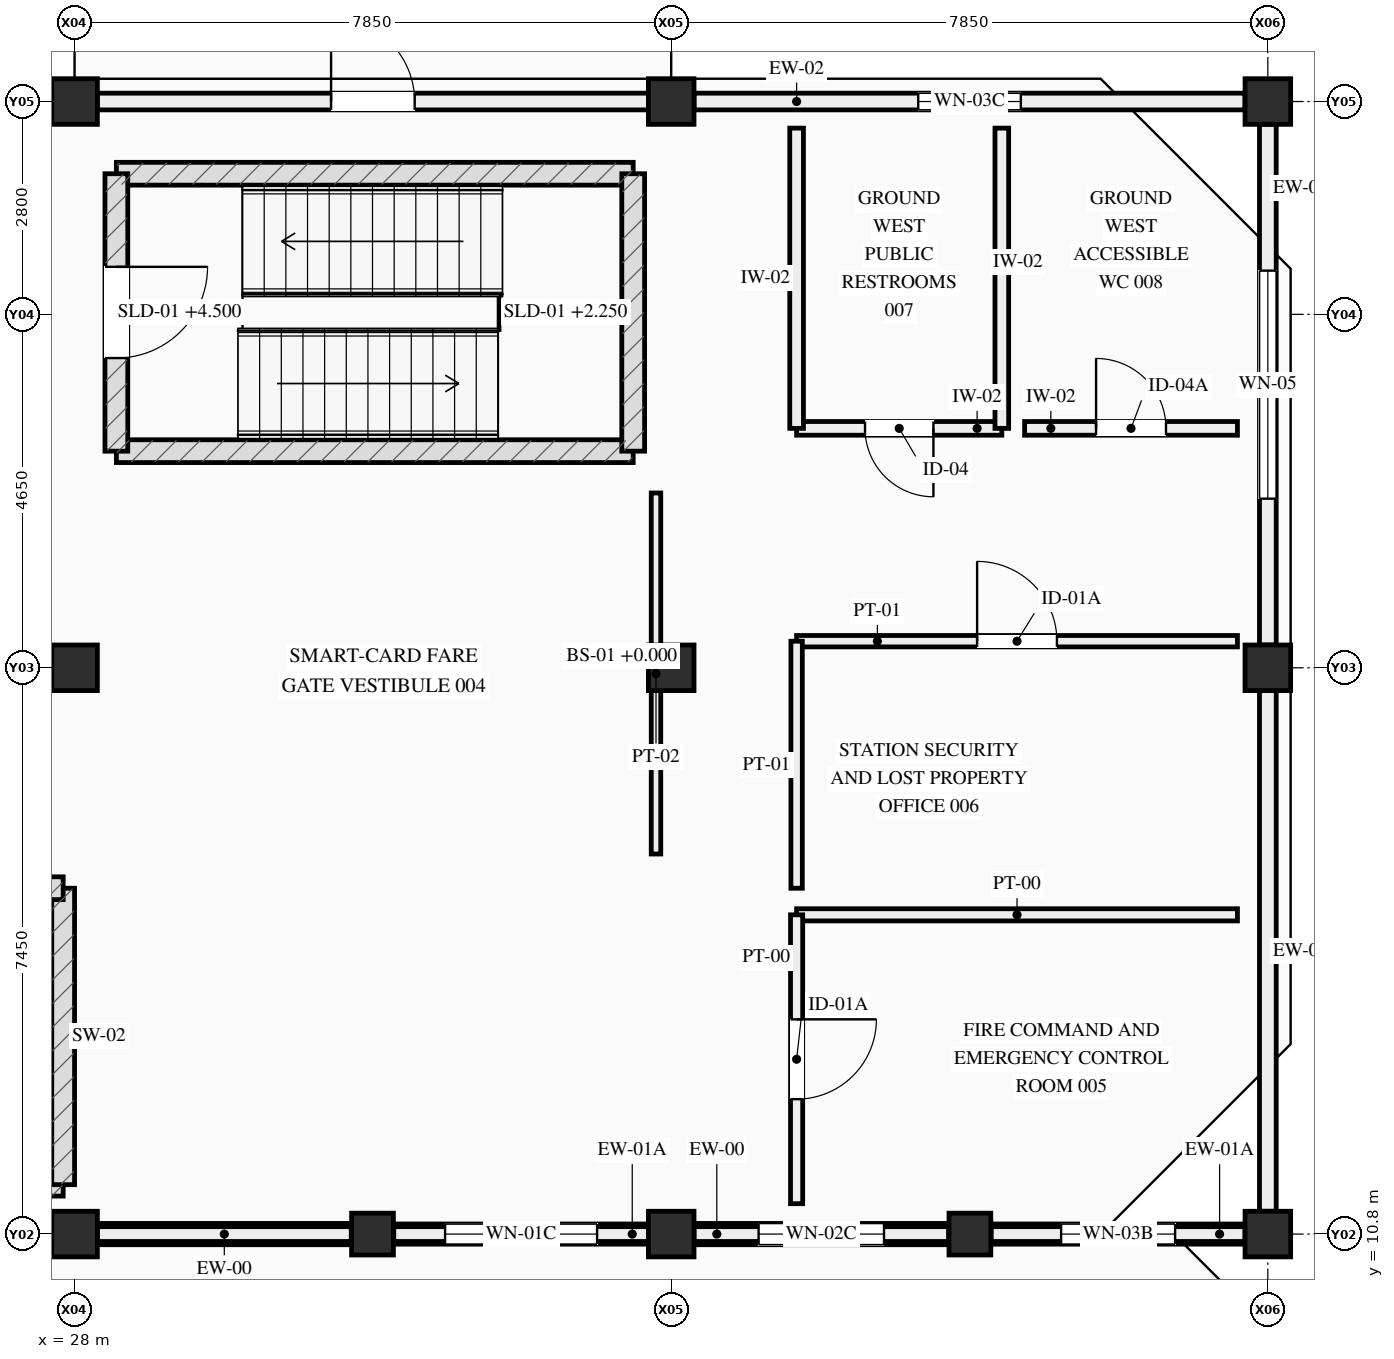
"""IFC4 building model, lengths in metres.
Left out: names, types, materials, properties, quantities, classifications, styles, units other than length and angle.
Written with IfcOpenShell. Run it as: python <this file> out.ifc"""

import sys

from ifc_helpers import new_model, si_unit, direction, frame, frame_2d, origin, origin_2d, place, context, subcontext, project, spatial, rectangle, circle, extrude, element, fill, save


model = new_model("IFC4")
c1 = context("Model", 3, precision=1e-05, world=origin(), true_north=direction((0.0, 1.0)))
c2 = subcontext(c1, "Body", "Model", "MODEL_VIEW")
j1 = project(units=[si_unit("LENGTHUNIT", "METRE"), si_unit("PLANEANGLEUNIT", "RADIAN")], contexts=[c1])
p1 = place(None, origin())
s1 = spatial("IfcSite", under=j1, at=p1, CompositionType="ELEMENT")
p2 = place(p1, origin())
s2 = spatial("IfcBuilding", under=s1, at=p2, CompositionType="ELEMENT")
p3 = place(p2, origin())
s3 = spatial("IfcBuildingStorey", under=s2, at=p3, CompositionType="ELEMENT", Elevation=0.0)
for number, where, z_axis, x_axis in (
    (1, (28.0, 10.8, 0.0), (0.0, 0.0, 1.0), (1.0, 0.0, 0.0)),
    (2, (28.0, 18.25, 0.0), (0.0, 0.0, 1.0), (1.0, 0.0, 0.0)),
    (3, (28.0, 25.7, 0.0), (0.0, 0.0, 1.0), (1.0, 0.0, 0.0)),
    (4, (35.85, 10.8, 0.0), (0.0, 0.0, 1.0), (1.0, 0.0, 0.0)),
    (5, (35.85, 18.25, 0.0), (0.0, 0.0, 1.0), (1.0, 0.0, 0.0)),
    (6, (35.85, 25.7, 0.0), (0.0, 0.0, 1.0), (1.0, 0.0, 0.0)),
    (7, (43.7, 10.8, 0.0), (0.0, 0.0, 1.0), (1.0, 0.0, 0.0)),
    (8, (43.7, 18.25, 0.0), (0.0, 0.0, 1.0), (1.0, 0.0, 0.0)),
    (9, (43.7, 25.7, 0.0), (0.0, 0.0, 1.0), (1.0, 0.0, 0.0)),
):
    element("IfcColumn", number, at=place(p3, frame(where, z_axis=z_axis, x_axis=x_axis)), inside=s3, PredefinedType="COLUMN", context=c2, shape_type="SweptSolid", body=[
        extrude(rectangle(XDim=0.6, YDim=0.6, at=origin_2d()), origin(), (0.0, 0.0, 1.0), 4.5),
    ])
for number, where, z_axis, x_axis in (
    (10, (31.92, 10.8, 0.0), (0.0, 0.0, 1.0), (1.0, 0.0, 0.0)),
    (11, (39.78, 10.8, 0.0), (0.0, 0.0, 1.0), (1.0, 0.0, 0.0)),
):
    element("IfcColumn", number, at=place(p3, frame(where, z_axis=z_axis, x_axis=x_axis)), inside=s3, PredefinedType="PILASTER", context=c2, shape_type="SweptSolid", body=[
        extrude(circle(Radius=0.275, at=origin_2d()), origin(), (0.0, 0.0, 1.0), 4.5),
    ])
p4 = place(p3, frame((31.64, 10.8, 0.0), z_axis=(0.0, 0.0, 1.0), x_axis=(-1.0, 0.0, 0.0)))
e12 = element("IfcWall", 12, at=p4, inside=s3, PredefinedType="STANDARD", context=c2, shape_type="SweptSolid", body=[
    extrude(rectangle(XDim=3.34, YDim=0.28, at=frame_2d((1.67, 0.0))), origin(), (0.0, 0.0, 1.0), 2.985),
])
p5 = place(p3, frame((31.64, 10.8, 3.35), z_axis=(0.0, 0.0, 1.0), x_axis=(-1.0, 0.0, 0.0)))
e13 = element("IfcWall", 13, at=p5, inside=s3, PredefinedType="STANDARD", context=c2, shape_type="SweptSolid", body=[
    extrude(rectangle(XDim=3.34, YDim=0.195, at=frame_2d((1.67, 0.0))), origin(), (0.0, 0.0, 1.0), 0.23),
])
p6 = place(p3, frame((35.55, 10.8, 0.0), z_axis=(0.0, 0.0, 1.0), x_axis=(-1.0, 0.0, 0.0)))
e14 = element("IfcWall", 14, at=p6, inside=s3, PredefinedType="STANDARD", context=c2, shape_type="SweptSolid", body=[
    extrude(rectangle(XDim=3.35, YDim=0.265, at=frame_2d((1.675, 0.0))), origin(), (0.0, 0.0, 1.0), 2.985),
])
p7 = place(p6, frame((0.675, 0.0, 0.92)))
e15 = element("IfcOpeningElement", 15, at=p7, cuts=e14, PredefinedType="OPENING", context=c2, shape_type="SweptSolid", body=[
    extrude(rectangle(XDim=2.0, YDim=1.5, at=frame_2d((1.0, 0.75))), frame((0.0, 0.142, 0.0), z_axis=(0.0, -1.0, 0.0), x_axis=(1.0, 0.0, 0.0)), (0.0, 0.0, 1.0), 0.285),
])
p8 = place(p3, frame((35.55, 10.8, 3.35), z_axis=(0.0, 0.0, 1.0), x_axis=(-1.0, 0.0, 0.0)))
e16 = element("IfcWall", 16, at=p8, inside=s3, PredefinedType="STANDARD", context=c2, shape_type="SweptSolid", body=[
    extrude(rectangle(XDim=3.35, YDim=0.195, at=frame_2d((1.675, 0.0))), origin(), (0.0, 0.0, 1.0), 0.23),
])
p9 = place(p3, frame((28.3, 25.7, 0.0), z_axis=(0.0, 0.0, 1.0), x_axis=(1.0, 0.0, 0.0)))
e17 = element("IfcWall", 17, at=p9, inside=s3, PredefinedType="STANDARD", context=c2, shape_type="SweptSolid", body=[
    extrude(rectangle(XDim=7.25, YDim=0.22, at=frame_2d((3.625, 0.0))), origin(), (0.0, 0.0, 1.0), 3.58),
])
p10 = place(p9, frame((3.075, 0.0, 0.0)))
e18 = element("IfcOpeningElement", 18, at=p10, cuts=e17, PredefinedType="OPENING", context=c2, shape_type="SweptSolid", body=[
    extrude(rectangle(XDim=1.1, YDim=2.2, at=frame_2d((0.55, 1.1))), frame((0.0, 0.12, 0.0), z_axis=(0.0, -1.0, 0.0), x_axis=(1.0, 0.0, 0.0)), (0.0, 0.0, 1.0), 0.24),
])
p11 = place(p3, frame((39.5, 10.8, 0.0), z_axis=(0.0, 0.0, 1.0), x_axis=(-1.0, 0.0, 0.0)))
e19 = element("IfcWall", 19, at=p11, inside=s3, PredefinedType="STANDARD", context=c2, shape_type="SweptSolid", body=[
    extrude(rectangle(XDim=3.35, YDim=0.28, at=frame_2d((1.675, 0.0))), origin(), (0.0, 0.0, 1.0), 2.985),
])
p12 = place(p11, frame((0.85, 0.0, 0.95)))
e20 = element("IfcOpeningElement", 20, at=p12, cuts=e19, PredefinedType="OPENING", context=c2, shape_type="SweptSolid", body=[
    extrude(rectangle(XDim=1.65, YDim=1.45, at=frame_2d((0.825, 0.725))), frame((0.0, 0.15, 0.0), z_axis=(0.0, -1.0, 0.0), x_axis=(1.0, 0.0, 0.0)), (0.0, 0.0, 1.0), 0.3),
])
p13 = place(p3, frame((39.5, 10.8, 3.35), z_axis=(0.0, 0.0, 1.0), x_axis=(-1.0, 0.0, 0.0)))
e21 = element("IfcWall", 21, at=p13, inside=s3, PredefinedType="STANDARD", context=c2, shape_type="SweptSolid", body=[
    extrude(rectangle(XDim=3.35, YDim=0.195, at=frame_2d((1.675, 0.0))), origin(), (0.0, 0.0, 1.0), 0.23),
])
p14 = place(p3, frame((43.4, 10.8, 0.0), z_axis=(0.0, 0.0, 1.0), x_axis=(-1.0, 0.0, 0.0)))
e22 = element("IfcWall", 22, at=p14, inside=s3, PredefinedType="STANDARD", context=c2, shape_type="SweptSolid", body=[
    extrude(rectangle(XDim=3.34, YDim=0.265, at=frame_2d((1.67, 0.0))), origin(), (0.0, 0.0, 1.0), 2.985),
])
p15 = place(p14, frame((0.92, 0.0, 1.0)))
e23 = element("IfcOpeningElement", 23, at=p15, cuts=e22, PredefinedType="OPENING", context=c2, shape_type="SweptSolid", body=[
    extrude(rectangle(XDim=1.5, YDim=1.25, at=frame_2d((0.75, 0.625))), frame((0.0, 0.142, 0.0), z_axis=(0.0, -1.0, 0.0), x_axis=(1.0, 0.0, 0.0)), (0.0, 0.0, 1.0), 0.285),
])
p16 = place(p3, frame((43.4, 10.8, 3.35), z_axis=(0.0, 0.0, 1.0), x_axis=(-1.0, 0.0, 0.0)))
e24 = element("IfcWall", 24, at=p16, inside=s3, PredefinedType="STANDARD", context=c2, shape_type="SweptSolid", body=[
    extrude(rectangle(XDim=3.34, YDim=0.195, at=frame_2d((1.67, 0.0))), origin(), (0.0, 0.0, 1.0), 0.23),
])
p17 = place(p3, frame((36.15, 25.7, 0.0), z_axis=(0.0, 0.0, 1.0), x_axis=(1.0, 0.0, 0.0)))
e25 = element("IfcWall", 25, at=p17, inside=s3, PredefinedType="STANDARD", context=c2, shape_type="SweptSolid", body=[
    extrude(rectangle(XDim=7.25, YDim=0.22, at=frame_2d((3.625, 0.0))), origin(), (0.0, 0.0, 1.0), 3.24),
])
p18 = place(p17, frame((2.95, 0.0, 0.98)))
e26 = element("IfcOpeningElement", 26, at=p18, cuts=e25, PredefinedType="OPENING", context=c2, shape_type="SweptSolid", body=[
    extrude(rectangle(XDim=1.35, YDim=1.35, at=frame_2d((0.675, 0.675))), frame((0.0, 0.12, 0.0), z_axis=(0.0, -1.0, 0.0), x_axis=(1.0, 0.0, 0.0)), (0.0, 0.0, 1.0), 0.24),
])
p19 = place(p3, frame((43.7, 17.95, 0.0), z_axis=(0.0, 0.0, 1.0), x_axis=(0.0, -1.0, 0.0)))
e27 = element("IfcWall", 27, at=p19, inside=s3, PredefinedType="STANDARD", context=c2, shape_type="SweptSolid", body=[
    extrude(rectangle(XDim=6.85, YDim=0.22, at=frame_2d((3.425, 0.0))), origin(), (0.0, 0.0, 1.0), 3.58),
])
p20 = place(p3, frame((43.7, 25.4, 0.0), z_axis=(0.0, 0.0, 1.0), x_axis=(0.0, -1.0, 0.0)))
e28 = element("IfcWall", 28, at=p20, inside=s3, PredefinedType="STANDARD", context=c2, shape_type="SweptSolid", body=[
    extrude(rectangle(XDim=6.85, YDim=0.22, at=frame_2d((3.425, 0.0))), origin(), (0.0, 0.0, 1.0), 3.24),
])
p21 = place(p20, frame((1.925, 0.0, 0.88)))
e29 = element("IfcOpeningElement", 29, at=p21, cuts=e28, PredefinedType="OPENING", context=c2, shape_type="SweptSolid", body=[
    extrude(rectangle(XDim=3.0, YDim=1.45, at=frame_2d((1.5, 0.725))), frame((0.0, 0.12, 0.0), z_axis=(0.0, -1.0, 0.0), x_axis=(1.0, 0.0, 0.0)), (0.0, 0.0, 1.0), 0.24),
])
for number, where, z_axis, x_axis in (
    (30, (35.35, 21.1, 0.0), (0.0, 0.0, 1.0), (-1.0, 0.0, 0.0)),
    (31, (28.55, 24.75, 0.0), (0.0, 0.0, 1.0), (1.0, 0.0, 0.0)),
):
    element("IfcWall", number, at=place(p3, frame(where, z_axis=z_axis, x_axis=x_axis)), inside=s3, PredefinedType="SHEAR", context=c2, shape_type="SweptSolid", body=[
        extrude(rectangle(XDim=6.8, YDim=0.3, at=frame_2d((3.4, 0.0))), origin(), (0.0, 0.0, 1.0), 4.26),
    ])
p22 = place(p3, frame((28.55, 21.1, 0.0), z_axis=(0.0, 0.0, 1.0), x_axis=(0.0, 1.0, 0.0)))
e32 = element("IfcWall", 32, at=p22, inside=s3, PredefinedType="SHEAR", context=c2, shape_type="SweptSolid", body=[
    extrude(rectangle(XDim=3.65, YDim=0.3, at=frame_2d((1.825, 0.0))), origin(), (0.0, 0.0, 1.0), 4.26),
])
p23 = place(p22, frame((1.225, 0.0, 0.0)))
e33 = element("IfcOpeningElement", 33, at=p23, cuts=e32, PredefinedType="OPENING", context=c2, shape_type="SweptSolid", body=[
    extrude(rectangle(XDim=1.2, YDim=2.2, at=frame_2d((0.6, 1.1))), frame((0.0, 0.16, 0.0), z_axis=(0.0, -1.0, 0.0), x_axis=(1.0, 0.0, 0.0)), (0.0, 0.0, 1.0), 0.32),
])
p24 = place(p3, frame((35.35, 24.75, 0.0), z_axis=(0.0, 0.0, 1.0), x_axis=(0.0, -1.0, 0.0)))
e34 = element("IfcWall", 34, at=p24, inside=s3, PredefinedType="SHEAR", context=c2, shape_type="SweptSolid", body=[
    extrude(rectangle(XDim=3.65, YDim=0.3, at=frame_2d((1.825, 0.0))), origin(), (0.0, 0.0, 1.0), 4.26),
])
p25 = place(p3, frame((20.2, 11.45, 0.0), z_axis=(0.0, 0.0, 1.0), x_axis=(1.0, 0.0, 0.0)))
e35 = element("IfcWall", 35, at=p25, inside=s3, PredefinedType="SHEAR", context=c2, shape_type="SweptSolid", body=[
    extrude(rectangle(XDim=7.65, YDim=0.3, at=frame_2d((3.825, 0.0))), origin(), (0.0, 0.0, 1.0), 4.26),
])
p26 = place(p3, frame((27.85, 11.45, 0.0), z_axis=(0.0, 0.0, 1.0), x_axis=(0.0, 1.0, 0.0)))
e36 = element("IfcWall", 36, at=p26, inside=s3, PredefinedType="SHEAR", context=c2, shape_type="SweptSolid", body=[
    extrude(rectangle(XDim=3.9, YDim=0.3, at=frame_2d((1.95, 0.0))), origin(), (0.0, 0.0, 1.0), 4.26),
])
p27 = place(p3, frame((20.2, 15.35, 0.0), z_axis=(0.0, 0.0, 1.0), x_axis=(1.0, 0.0, 0.0)))
e37 = element("IfcWall", 37, at=p27, inside=s3, PredefinedType="SHEAR", context=c2, shape_type="SweptSolid", body=[
    extrude(rectangle(XDim=7.65, YDim=0.3, at=frame_2d((3.825, 0.0))), origin(), (0.0, 0.0, 1.0), 4.26),
])
p28 = place(p3, frame((35.65, 15.8, 0.0), z_axis=(0.0, 0.0, 1.0), x_axis=(0.0, 1.0, 0.0)))
e38 = element("IfcWall", 38, at=p28, inside=s3, PredefinedType="PARTITIONING", context=c2, shape_type="SweptSolid", body=[
    extrude(rectangle(XDim=4.75, YDim=0.125, at=frame_2d((2.375, 0.0))), origin(), (0.0, 0.0, 1.0), 3.3),
])
p29 = place(p3, frame((37.5, 15.0, 0.0), z_axis=(0.0, 0.0, 1.0), x_axis=(1.0, 0.0, 0.0)))
e39 = element("IfcWall", 39, at=p29, inside=s3, PredefinedType="PARTITIONING", context=c2, shape_type="SweptSolid", body=[
    extrude(rectangle(XDim=5.8, YDim=0.16, at=frame_2d((2.9, 0.0))), origin(), (0.0, 0.0, 1.0), 3.3),
])
p30 = place(p3, frame((37.5, 11.2, 0.0), z_axis=(0.0, 0.0, 1.0), x_axis=(0.0, 1.0, 0.0)))
e40 = element("IfcWall", 40, at=p30, inside=s3, PredefinedType="PARTITIONING", context=c2, shape_type="SweptSolid", body=[
    extrude(rectangle(XDim=3.8, YDim=0.16, at=frame_2d((1.9, 0.0))), origin(), (0.0, 0.0, 1.0), 3.3),
])
p31 = place(p30, frame((1.375, 0.0, 0.0)))
e41 = element("IfcOpeningElement", 41, at=p31, cuts=e40, PredefinedType="OPENING", context=c2, shape_type="SweptSolid", body=[
    extrude(rectangle(XDim=1.05, YDim=2.2, at=frame_2d((0.525, 1.1))), frame((0.0, 0.09, 0.0), z_axis=(0.0, -1.0, 0.0), x_axis=(1.0, 0.0, 0.0)), (0.0, 0.0, 1.0), 0.18),
])
p32 = place(p3, frame((37.5, 18.6, 0.0), z_axis=(0.0, 0.0, 1.0), x_axis=(1.0, 0.0, 0.0)))
e42 = element("IfcWall", 42, at=p32, inside=s3, PredefinedType="PARTITIONING", context=c2, shape_type="SweptSolid", body=[
    extrude(rectangle(XDim=5.8, YDim=0.15, at=frame_2d((2.9, 0.0))), origin(), (0.0, 0.0, 1.0), 3.3),
])
p33 = place(p32, frame((2.375, 0.0, 0.0)))
e43 = element("IfcOpeningElement", 43, at=p33, cuts=e42, PredefinedType="OPENING", context=c2, shape_type="SweptSolid", body=[
    extrude(rectangle(XDim=1.05, YDim=2.2, at=frame_2d((0.525, 1.1))), frame((0.0, 0.085, 0.0), z_axis=(0.0, -1.0, 0.0), x_axis=(1.0, 0.0, 0.0)), (0.0, 0.0, 1.0), 0.17),
])
p34 = place(p3, frame((37.5, 15.35, 0.0), z_axis=(0.0, 0.0, 1.0), x_axis=(0.0, 1.0, 0.0)))
e44 = element("IfcWall", 44, at=p34, inside=s3, PredefinedType="PARTITIONING", context=c2, shape_type="SweptSolid", body=[
    extrude(rectangle(XDim=3.25, YDim=0.15, at=frame_2d((1.625, 0.0))), origin(), (0.0, 0.0, 1.0), 3.3),
])
p35 = place(p3, frame((37.5, 21.4, 0.0), z_axis=(0.0, 0.0, 1.0), x_axis=(1.0, 0.0, 0.0)))
e45 = element("IfcWall", 45, at=p35, inside=s3, PredefinedType="PLUMBINGWALL", context=c2, shape_type="SweptSolid", body=[
    extrude(rectangle(XDim=2.7, YDim=0.18, at=frame_2d((1.35, 0.0))), origin(), (0.0, 0.0, 1.0), 3.3),
])
p36 = place(p35, frame((0.9, 0.0, 0.0)))
e46 = element("IfcOpeningElement", 46, at=p36, cuts=e45, PredefinedType="OPENING", context=c2, shape_type="SweptSolid", body=[
    extrude(rectangle(XDim=0.9, YDim=2.1, at=frame_2d((0.45, 1.05))), frame((0.0, 0.1, 0.0), z_axis=(0.0, -1.0, 0.0), x_axis=(1.0, 0.0, 0.0)), (0.0, 0.0, 1.0), 0.2),
])
for number, where, z_axis, x_axis in (
    (47, (37.5, 21.4, 0.0), (0.0, 0.0, 1.0), (0.0, 1.0, 0.0)),
    (48, (40.2, 21.4, 0.0), (0.0, 0.0, 1.0), (0.0, 1.0, 0.0)),
):
    element("IfcWall", number, at=place(p3, frame(where, z_axis=z_axis, x_axis=x_axis)), inside=s3, PredefinedType="PLUMBINGWALL", context=c2, shape_type="SweptSolid", body=[
        extrude(rectangle(XDim=3.95, YDim=0.18, at=frame_2d((1.975, 0.0))), origin(), (0.0, 0.0, 1.0), 3.3),
    ])
p37 = place(p3, frame((40.5, 21.4, 0.0), z_axis=(0.0, 0.0, 1.0), x_axis=(1.0, 0.0, 0.0)))
e49 = element("IfcWall", 49, at=p37, inside=s3, PredefinedType="PLUMBINGWALL", context=c2, shape_type="SweptSolid", body=[
    extrude(rectangle(XDim=2.8, YDim=0.18, at=frame_2d((1.4, 0.0))), origin(), (0.0, 0.0, 1.0), 3.3),
])
p38 = place(p37, frame((0.94, 0.0, 0.0)))
e50 = element("IfcOpeningElement", 50, at=p38, cuts=e49, PredefinedType="OPENING", context=c2, shape_type="SweptSolid", body=[
    extrude(rectangle(XDim=0.92, YDim=2.1, at=frame_2d((0.46, 1.05))), frame((0.0, 0.1, 0.0), z_axis=(0.0, -1.0, 0.0), x_axis=(1.0, 0.0, 0.0)), (0.0, 0.0, 1.0), 0.2),
])
p39 = place(p7, origin())
e51 = element("IfcWindow", 51, at=p39, inside=s3, PartitioningType="SINGLE_PANEL", PredefinedType="WINDOW", context=c2, shape_type="SweptSolid", body=[
    extrude(rectangle(XDim=2.0, YDim=1.5, at=frame_2d((1.0, 0.75))), frame((0.0, 0.03, 0.0), z_axis=(0.0, -1.0, 0.0), x_axis=(1.0, 0.0, 0.0)), (0.0, 0.0, 1.0), 0.06),
])
fill(e15, e51)
p40 = place(p10, origin())
e52 = element("IfcDoor", 52, at=p40, inside=s3, OperationType="SINGLE_SWING_LEFT", PredefinedType="DOOR", context=c2, shape_type="SweptSolid", body=[
    extrude(rectangle(XDim=1.1, YDim=2.2, at=frame_2d((0.55, 1.1))), frame((0.0, 0.025, 0.0), z_axis=(0.0, -1.0, 0.0), x_axis=(1.0, 0.0, 0.0)), (0.0, 0.0, 1.0), 0.05),
])
fill(e18, e52)
p41 = place(p12, origin())
e53 = element("IfcWindow", 53, at=p41, inside=s3, PartitioningType="SINGLE_PANEL", PredefinedType="WINDOW", context=c2, shape_type="SweptSolid", body=[
    extrude(rectangle(XDim=1.65, YDim=1.45, at=frame_2d((0.825, 0.725))), frame((0.0, 0.03, 0.0), z_axis=(0.0, -1.0, 0.0), x_axis=(1.0, 0.0, 0.0)), (0.0, 0.0, 1.0), 0.06),
])
fill(e20, e53)
p42 = place(p15, origin())
e54 = element("IfcWindow", 54, at=p42, inside=s3, PartitioningType="SINGLE_PANEL", PredefinedType="WINDOW", context=c2, shape_type="SweptSolid", body=[
    extrude(rectangle(XDim=1.5, YDim=1.25, at=frame_2d((0.75, 0.625))), frame((0.0, 0.03, 0.0), z_axis=(0.0, -1.0, 0.0), x_axis=(1.0, 0.0, 0.0)), (0.0, 0.0, 1.0), 0.06),
])
fill(e23, e54)
p43 = place(p18, origin())
e55 = element("IfcWindow", 55, at=p43, inside=s3, PartitioningType="SINGLE_PANEL", PredefinedType="WINDOW", context=c2, shape_type="SweptSolid", body=[
    extrude(rectangle(XDim=1.35, YDim=1.35, at=frame_2d((0.675, 0.675))), frame((0.0, 0.03, 0.0), z_axis=(0.0, -1.0, 0.0), x_axis=(1.0, 0.0, 0.0)), (0.0, 0.0, 1.0), 0.06),
])
fill(e26, e55)
p44 = place(p21, origin())
e56 = element("IfcWindow", 56, at=p44, inside=s3, PartitioningType="SINGLE_PANEL", PredefinedType="WINDOW", context=c2, shape_type="SweptSolid", body=[
    extrude(rectangle(XDim=3.0, YDim=1.45, at=frame_2d((1.5, 0.725))), frame((0.0, 0.03, 0.0), z_axis=(0.0, -1.0, 0.0), x_axis=(1.0, 0.0, 0.0)), (0.0, 0.0, 1.0), 0.06),
])
fill(e29, e56)
p45 = place(p23, origin())
e57 = element("IfcDoor", 57, at=p45, inside=s3, OperationType="SINGLE_SWING_RIGHT", PredefinedType="DOOR", context=c2, shape_type="SweptSolid", body=[
    extrude(rectangle(XDim=1.2, YDim=2.2, at=frame_2d((0.6, 1.1))), frame((0.0, 0.025, 0.0), z_axis=(0.0, -1.0, 0.0), x_axis=(1.0, 0.0, 0.0)), (0.0, 0.0, 1.0), 0.05),
])
fill(e33, e57)
p46 = place(p31, origin())
e58 = element("IfcDoor", 58, at=p46, inside=s3, OperationType="SINGLE_SWING_RIGHT", PredefinedType="DOOR", context=c2, shape_type="SweptSolid", body=[
    extrude(rectangle(XDim=1.05, YDim=2.2, at=frame_2d((0.525, 1.1))), frame((0.0, 0.025, 0.0), z_axis=(0.0, -1.0, 0.0), x_axis=(1.0, 0.0, 0.0)), (0.0, 0.0, 1.0), 0.05),
])
fill(e41, e58)
p47 = place(p33, origin())
e59 = element("IfcDoor", 59, at=p47, inside=s3, OperationType="SINGLE_SWING_LEFT", PredefinedType="DOOR", context=c2, shape_type="SweptSolid", body=[
    extrude(rectangle(XDim=1.05, YDim=2.2, at=frame_2d((0.525, 1.1))), frame((0.0, 0.025, 0.0), z_axis=(0.0, -1.0, 0.0), x_axis=(1.0, 0.0, 0.0)), (0.0, 0.0, 1.0), 0.05),
])
fill(e43, e59)
p48 = place(p36, origin())
e60 = element("IfcDoor", 60, at=p48, inside=s3, OperationType="SINGLE_SWING_RIGHT", PredefinedType="DOOR", context=c2, shape_type="SweptSolid", body=[
    extrude(rectangle(XDim=0.9, YDim=2.1, at=frame_2d((0.45, 1.05))), frame((0.0, 0.025, 0.0), z_axis=(0.0, -1.0, 0.0), x_axis=(1.0, 0.0, 0.0)), (0.0, 0.0, 1.0), 0.05),
])
fill(e46, e60)
p49 = place(p38, origin())
e61 = element("IfcDoor", 61, at=p49, inside=s3, OperationType="SINGLE_SWING_LEFT", PredefinedType="DOOR", context=c2, shape_type="SweptSolid", body=[
    extrude(rectangle(XDim=0.92, YDim=2.1, at=frame_2d((0.46, 1.05))), frame((0.0, 0.025, 0.0), z_axis=(0.0, -1.0, 0.0), x_axis=(1.0, 0.0, 0.0)), (0.0, 0.0, 1.0), 0.05),
])
fill(e50, e61)
save(model, sys.argv[1])
